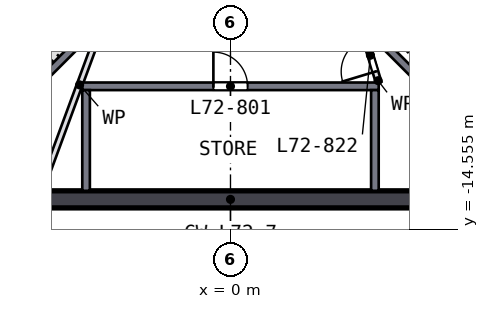
"""IFC4 building model, lengths in metres.
Left out: names, types, materials, properties, quantities, classifications, styles, units other than length and angle.
Written with IfcOpenShell. Run it as: python <this file> out.ifc"""

import sys

from ifc_helpers import new_model, si_unit, direction, frame, frame_2d, origin, place, context, subcontext, project, spatial, rectangle, extrude, element, fill, save


model = new_model("IFC4")
c1 = context("Model", 3, precision=1e-05, world=origin(), true_north=direction((0.0, 1.0)))
c2 = subcontext(c1, "Body", "Model", "MODEL_VIEW")
j1 = project(units=[si_unit("LENGTHUNIT", "METRE"), si_unit("PLANEANGLEUNIT", "RADIAN")], contexts=[c1])
p1 = place(None, origin())
s1 = spatial("IfcSite", under=j1, at=p1, CompositionType="ELEMENT")
p2 = place(p1, origin())
s2 = spatial("IfcBuilding", under=s1, at=p2, CompositionType="ELEMENT")
p3 = place(p2, frame((0.0, 0.0, 291.5)))
s3 = spatial("IfcBuildingStorey", under=s2, at=p3, CompositionType="ELEMENT", Elevation=291.5)
p4 = place(p3, frame((-5.799, -13.775, 0.0), z_axis=(0.0, 0.0, 1.0), x_axis=(1.0, 0.0, 0.0)))
e1 = element("IfcWall", 1, at=p4, inside=s3, PredefinedType="SHEAR", context=c2, shape_type="SweptSolid", body=[
    extrude(rectangle(XDim=11.598, YDim=0.45, at=frame_2d((5.799, 0.0))), origin(), (0.0, 0.0, 1.0), 3.5),
])
p5 = place(p3, frame((-3.9, -10.8, 0.0), z_axis=(0.0, 0.0, 1.0), x_axis=(1.0, 0.0, 0.0)))
e2 = element("IfcWall", 2, at=p5, inside=s3, PredefinedType="SOLIDWALL", context=c2, shape_type="SweptSolid", body=[
    extrude(rectangle(XDim=7.8, YDim=0.2, at=frame_2d((3.9, 0.0))), origin(), (0.0, 0.0, 1.0), 3.19),
])
p6 = place(p5, frame((3.45, 0.0, 0.0)))
e3 = element("IfcOpeningElement", 3, at=p6, cuts=e2, PredefinedType="OPENING", context=c2, shape_type="SweptSolid", body=[
    extrude(rectangle(XDim=0.9, YDim=2.1, at=frame_2d((0.45, 1.05))), frame((0.0, 0.11, 0.0), z_axis=(0.0, -1.0, 0.0), x_axis=(1.0, 0.0, 0.0)), (0.0, 0.0, 1.0), 0.22),
])
for number, where, z_axis, x_axis in (
    (4, (-3.8, -10.9, 0.0), (0.0, 0.0, 1.0), (0.0, -1.0, 0.0)),
    (5, (3.8, -10.9, 0.0), (0.0, 0.0, 1.0), (0.0, -1.0, 0.0)),
):
    element("IfcWall", number, at=place(p3, frame(where, z_axis=z_axis, x_axis=x_axis)), inside=s3, PredefinedType="SOLIDWALL", context=c2, shape_type="SweptSolid", body=[
        extrude(rectangle(XDim=2.65, YDim=0.2, at=frame_2d((1.325, 0.0))), origin(), (0.0, 0.0, 1.0), 3.19),
    ])
for number, where, z_axis, x_axis in (
    (6, (-3.677, -9.334, 0.0), (0.0, 0.0, 1.0), (-0.707, -0.707, 0.0)),
    (7, (3.677, -9.334, 0.0), (0.0, 0.0, 1.0), (0.707, -0.707, 0.0)),
):
    element("IfcWall", number, at=place(p3, frame(where, z_axis=z_axis, x_axis=x_axis)), inside=s3, PredefinedType="SOLIDWALL", context=c2, shape_type="SweptSolid", body=[
        extrude(rectangle(XDim=4.35, YDim=0.2, at=frame_2d((2.175, 0.0))), origin(), (0.0, 0.0, 1.0), 3.19),
    ])
p7 = place(p3, frame((3.9, -10.7, 0.0), z_axis=(0.0, 0.0, 1.0), x_axis=(-0.289808785, 0.957084567, 0.0)))
e8 = element("IfcWall", 8, at=p7, inside=s3, PredefinedType="PARTITIONING", context=c2, shape_type="SweptSolid", body=[
    extrude(rectangle(XDim=1.501, YDim=0.15, at=frame_2d((0.75, 0.0))), origin(), (0.0, 0.0, 1.0), 3.19),
])
p8 = place(p7, frame((0.301, 0.0, 0.0)))
e9 = element("IfcOpeningElement", 9, at=p8, cuts=e8, PredefinedType="OPENING", context=c2, shape_type="SweptSolid", body=[
    extrude(rectangle(XDim=0.9, YDim=2.1, at=frame_2d((0.45, 1.05))), frame((0.0, 0.085, 0.0), z_axis=(0.0, -1.0, 0.0), x_axis=(1.0, 0.0, 0.0)), (0.0, 0.0, 1.0), 0.17),
])
p9 = place(p3, frame((-1.776, -4.813, 0.0), z_axis=(0.0, 0.0, 1.0), x_axis=(-0.346114844, -0.938192152, 0.0)))
e10 = element("IfcWall", 10, at=p9, inside=s3, PredefinedType="PARTITIONING", context=c2, shape_type="SweptSolid", body=[
    extrude(rectangle(XDim=9.283, YDim=0.15, at=frame_2d((4.641, 0.0))), origin(), (0.0, 0.0, 1.0), 3.19),
])
p10 = place(p9, frame((1.4, 0.0, 0.0)))
e11 = element("IfcOpeningElement", 11, at=p10, cuts=e10, PredefinedType="OPENING", context=c2, shape_type="SweptSolid", body=[
    extrude(rectangle(XDim=1.8, YDim=2.1, at=frame_2d((0.9, 1.05))), frame((0.0, 0.085, 0.0), z_axis=(0.0, -1.0, 0.0), x_axis=(1.0, 0.0, 0.0)), (0.0, 0.0, 1.0), 0.17),
])
p11 = place(p3, frame((-3.888, -17.917, 0.0), z_axis=(0.0, 0.0, 1.0), x_axis=(-0.893848004, 0.448370098, 0.0)))
e12 = element("IfcWall", 12, at=p11, inside=s3, PredefinedType="SOLIDWALL", context=c2, shape_type="SweptSolid", body=[
    extrude(rectangle(XDim=9.117, YDim=0.2, at=frame_2d((4.558, 0.0))), origin(), (0.0, 0.0, 1.0), 3.19),
])
p12 = place(p11, frame((6.458, 0.0, 0.0)))
e13 = element("IfcOpeningElement", 13, at=p12, cuts=e12, PredefinedType="OPENING", context=c2, shape_type="SweptSolid", body=[
    extrude(rectangle(XDim=1.0, YDim=2.1, at=frame_2d((0.5, 1.05))), frame((0.0, 0.11, 0.0), z_axis=(0.0, -1.0, 0.0), x_axis=(1.0, 0.0, 0.0)), (0.0, 0.0, 1.0), 0.22),
])
p13 = place(p6, origin())
e14 = element("IfcDoor", 14, at=p13, inside=s3, OperationType="SINGLE_SWING_LEFT", PredefinedType="DOOR", context=c2, shape_type="SweptSolid", body=[
    extrude(rectangle(XDim=0.9, YDim=2.1, at=frame_2d((0.45, 1.05))), frame((0.0, 0.025, 0.0), z_axis=(0.0, -1.0, 0.0), x_axis=(1.0, 0.0, 0.0)), (0.0, 0.0, 1.0), 0.05),
])
fill(e3, e14)
p14 = place(p8, origin())
e15 = element("IfcDoor", 15, at=p14, inside=s3, OperationType="SINGLE_SWING_LEFT", PredefinedType="DOOR", context=c2, shape_type="SweptSolid", body=[
    extrude(rectangle(XDim=0.9, YDim=2.1, at=frame_2d((0.45, 1.05))), frame((0.0, 0.025, 0.0), z_axis=(0.0, -1.0, 0.0), x_axis=(1.0, 0.0, 0.0)), (0.0, 0.0, 1.0), 0.05),
])
fill(e9, e15)
save(model, sys.argv[1])
